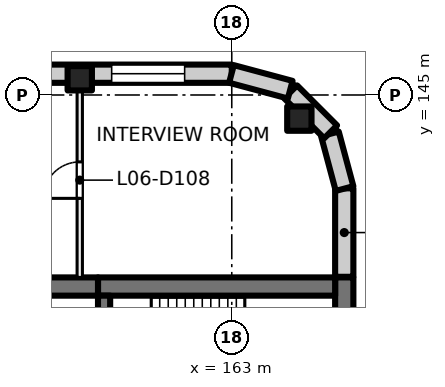
"""IFC4 building model, lengths in metres.
Left out: names, types, materials, properties, quantities, classifications, styles, units other than length and angle.
Written with IfcOpenShell. Run it as: python <this file> out.ifc"""

import sys

from ifc_helpers import new_model, si_unit, direction, frame, frame_2d, origin, origin_2d, place, context, subcontext, project, spatial, rectangle, extrude, element, fill, save


model = new_model("IFC4")
c1 = context("Model", 3, precision=1e-05, world=origin(), true_north=direction((0.0, 1.0)))
c2 = subcontext(c1, "Body", "Model", "MODEL_VIEW")
j1 = project(units=[si_unit("LENGTHUNIT", "METRE"), si_unit("PLANEANGLEUNIT", "RADIAN")], contexts=[c1])
p1 = place(None, origin())
s1 = spatial("IfcSite", under=j1, at=p1, CompositionType="ELEMENT")
p2 = place(p1, origin())
s2 = spatial("IfcBuilding", under=s1, at=p2, CompositionType="ELEMENT")
p3 = place(p2, frame((0.0, 0.0, 31.5)))
s3 = spatial("IfcBuildingStorey", under=s2, at=p3, CompositionType="ELEMENT", Elevation=31.5)
for number, where, z_axis, x_axis in (
    (1, (165.223, 144.223, 0.0), (0.0, 0.0, 1.0), (1.0, 0.0, 0.0)),
    (2, (158.0, 145.55, 0.0), (0.0, 0.0, 1.0), (1.0, 0.0, 0.0)),
):
    element("IfcColumn", number, at=place(p3, frame(where, z_axis=z_axis, x_axis=x_axis)), inside=s3, PredefinedType="COLUMN", context=c2, shape_type="SweptSolid", body=[
        extrude(rectangle(XDim=0.8, YDim=0.8, at=origin_2d()), origin(), (0.0, 0.0, 1.0), 4.0),
    ])
p4 = place(p3, frame((166.7, 139.0, 0.0), z_axis=(0.0, 0.0, 1.0), x_axis=(0.0, -1.0, 0.0)))
e3 = element("IfcWall", 3, at=p4, inside=s3, PredefinedType="SHEAR", context=c2, shape_type="SweptSolid", body=[
    extrude(rectangle(XDim=3.8, YDim=0.6, at=frame_2d((1.9, 0.0))), origin(), (0.0, 0.0, 1.0), 4.0),
])
p5 = place(p3, frame((166.4, 138.7, 0.0), z_axis=(0.0, 0.0, 1.0), x_axis=(-1.0, 0.0, 0.0)))
e4 = element("IfcWall", 4, at=p5, inside=s3, PredefinedType="SHEAR", context=c2, shape_type="SweptSolid", body=[
    extrude(rectangle(XDim=7.8, YDim=0.6, at=frame_2d((3.9, 0.0))), origin(), (0.0, 0.0, 1.0), 4.0),
])
p6 = place(p3, frame((158.6, 138.7, 0.0), z_axis=(0.0, 0.0, 1.0), x_axis=(-1.0, 0.0, 0.0)))
e5 = element("IfcWall", 5, at=p6, inside=s3, PredefinedType="SHEAR", context=c2, shape_type="SweptSolid", body=[
    extrude(rectangle(XDim=4.6, YDim=0.6, at=frame_2d((2.3, 0.0))), origin(), (0.0, 0.0, 1.0), 4.0),
])
p7 = place(p3, frame((158.8, 138.4, 0.0), z_axis=(0.0, 0.0, 1.0), x_axis=(0.0, -1.0, 0.0)))
e6 = element("IfcWall", 6, at=p7, inside=s3, PredefinedType="SHEAR", context=c2, shape_type="SweptSolid", body=[
    extrude(rectangle(XDim=2.8, YDim=0.4, at=frame_2d((1.4, 0.0))), origin(), (0.0, 0.0, 1.0), 4.0),
])
p8 = place(p7, frame((0.9, 0.0, 0.0)))
e7 = element("IfcOpeningElement", 7, at=p8, cuts=e6, PredefinedType="OPENING", context=c2, shape_type="SweptSolid", body=[
    extrude(rectangle(XDim=1.0, YDim=2.1, at=frame_2d((0.5, 1.05))), frame((0.0, 0.21, 0.0), z_axis=(0.0, -1.0, 0.0), x_axis=(1.0, 0.0, 0.0)), (0.0, 0.0, 1.0), 0.42),
])
p9 = place(p3, frame((131.07, 145.7, 0.0), z_axis=(0.0, 0.0, 1.0), x_axis=(1.0, 0.0, 0.0)))
e8 = element("IfcWall", 8, at=p9, inside=s3, PredefinedType="SOLIDWALL", context=c2, shape_type="SweptSolid", body=[
    extrude(rectangle(XDim=31.93, YDim=0.6, at=frame_2d((15.965, 0.0))), origin(), (0.0, 0.0, 1.0), 3.625),
])
p10 = place(p9, frame((0.98, 0.0, 0.9)))
e9 = element("IfcOpeningElement", 9, at=p10, cuts=e8, PredefinedType="OPENING", context=c2, shape_type="SweptSolid", body=[
    extrude(rectangle(XDim=2.4, YDim=2.4, at=frame_2d((1.2, 1.2))), frame((0.0, 0.31, 0.0), z_axis=(0.0, -1.0, 0.0), x_axis=(1.0, 0.0, 0.0)), (0.0, 0.0, 1.0), 0.62),
])
p11 = place(p9, frame((5.48, 0.0, 0.9)))
e10 = element("IfcOpeningElement", 10, at=p11, cuts=e8, PredefinedType="OPENING", context=c2, shape_type="SweptSolid", body=[
    extrude(rectangle(XDim=2.4, YDim=2.4, at=frame_2d((1.2, 1.2))), frame((0.0, 0.31, 0.0), z_axis=(0.0, -1.0, 0.0), x_axis=(1.0, 0.0, 0.0)), (0.0, 0.0, 1.0), 0.62),
])
p12 = place(p9, frame((9.98, 0.0, 0.9)))
e11 = element("IfcOpeningElement", 11, at=p12, cuts=e8, PredefinedType="OPENING", context=c2, shape_type="SweptSolid", body=[
    extrude(rectangle(XDim=2.4, YDim=2.4, at=frame_2d((1.2, 1.2))), frame((0.0, 0.31, 0.0), z_axis=(0.0, -1.0, 0.0), x_axis=(1.0, 0.0, 0.0)), (0.0, 0.0, 1.0), 0.62),
])
p13 = place(p9, frame((14.48, 0.0, 0.9)))
e12 = element("IfcOpeningElement", 12, at=p13, cuts=e8, PredefinedType="OPENING", context=c2, shape_type="SweptSolid", body=[
    extrude(rectangle(XDim=2.4, YDim=2.4, at=frame_2d((1.2, 1.2))), frame((0.0, 0.31, 0.0), z_axis=(0.0, -1.0, 0.0), x_axis=(1.0, 0.0, 0.0)), (0.0, 0.0, 1.0), 0.62),
])
p14 = place(p9, frame((18.98, 0.0, 0.9)))
e13 = element("IfcOpeningElement", 13, at=p14, cuts=e8, PredefinedType="OPENING", context=c2, shape_type="SweptSolid", body=[
    extrude(rectangle(XDim=2.4, YDim=2.4, at=frame_2d((1.2, 1.2))), frame((0.0, 0.31, 0.0), z_axis=(0.0, -1.0, 0.0), x_axis=(1.0, 0.0, 0.0)), (0.0, 0.0, 1.0), 0.62),
])
p15 = place(p9, frame((23.48, 0.0, 0.9)))
e14 = element("IfcOpeningElement", 14, at=p15, cuts=e8, PredefinedType="OPENING", context=c2, shape_type="SweptSolid", body=[
    extrude(rectangle(XDim=2.4, YDim=2.4, at=frame_2d((1.2, 1.2))), frame((0.0, 0.31, 0.0), z_axis=(0.0, -1.0, 0.0), x_axis=(1.0, 0.0, 0.0)), (0.0, 0.0, 1.0), 0.62),
])
p16 = place(p9, frame((27.98, 0.0, 0.9)))
e15 = element("IfcOpeningElement", 15, at=p16, cuts=e8, PredefinedType="OPENING", context=c2, shape_type="SweptSolid", body=[
    extrude(rectangle(XDim=2.4, YDim=2.4, at=frame_2d((1.2, 1.2))), frame((0.0, 0.31, 0.0), z_axis=(0.0, -1.0, 0.0), x_axis=(1.0, 0.0, 0.0)), (0.0, 0.0, 1.0), 0.62),
])
p17 = place(p3, frame((166.7, 141.93, 0.0), z_axis=(0.0, 0.0, 1.0), x_axis=(0.0, -1.0, 0.0)))
e16 = element("IfcWall", 16, at=p17, inside=s3, PredefinedType="SOLIDWALL", context=c2, shape_type="SweptSolid", body=[
    extrude(rectangle(XDim=2.91, YDim=0.6, at=frame_2d((1.455, 0.0))), origin(), (0.0, 0.0, 1.0), 3.625),
])
for number, where, z_axis, x_axis in (
    (17, (166.229, 143.719, 0.0), (0.0, 0.0, 1.0), (0.259, -0.966, 0.0)),
    (18, (164.936, 145.104, 0.0), (0.0, 0.0, 1.0), (0.707, -0.707, 0.0)),
):
    element("IfcWall", number, at=place(p3, frame(where, z_axis=z_axis, x_axis=x_axis)), inside=s3, PredefinedType="SOLIDWALL", context=c2, shape_type="SweptSolid", body=[
        extrude(rectangle(XDim=1.861, YDim=0.6, at=frame_2d((0.93, 0.0))), origin(), (0.0, 0.0, 1.0), 3.625),
    ])
p18 = place(p3, frame((162.99, 145.692, 0.0), z_axis=(0.0, 0.0, 1.0), x_axis=(0.965920269068, -0.258839784042, 0.0)))
e19 = element("IfcWall", 19, at=p18, inside=s3, PredefinedType="SOLIDWALL", context=c2, shape_type="SweptSolid", body=[
    extrude(rectangle(XDim=2.0, YDim=0.6, at=frame_2d((1.0, 0.0))), origin(), (0.0, 0.0, 1.0), 3.625),
])
p19 = place(p3, frame((158.0, 139.0, 0.0), z_axis=(0.0, 0.0, 1.0), x_axis=(0.0, 1.0, 0.0)))
e20 = element("IfcWall", 20, at=p19, inside=s3, PredefinedType="PARTITIONING", context=c2, shape_type="SweptSolid", body=[
    extrude(rectangle(XDim=6.4, YDim=0.175, at=frame_2d((3.2, 0.0))), origin(), (0.0, 0.0, 1.0), 3.625),
])
p20 = place(p19, frame((2.6, 0.0, 0.0)))
e21 = element("IfcOpeningElement", 21, at=p20, cuts=e20, PredefinedType="OPENING", context=c2, shape_type="SweptSolid", body=[
    extrude(rectangle(XDim=1.2, YDim=2.1, at=frame_2d((0.6, 1.05))), frame((0.0, 0.097, 0.0), z_axis=(0.0, -1.0, 0.0), x_axis=(1.0, 0.0, 0.0)), (0.0, 0.0, 1.0), 0.195),
])
p21 = place(p16, origin())
e22 = element("IfcWindow", 22, at=p21, inside=s3, PartitioningType="SINGLE_PANEL", PredefinedType="WINDOW", context=c2, shape_type="SweptSolid", body=[
    extrude(rectangle(XDim=2.4, YDim=2.4, at=frame_2d((1.2, 1.2))), frame((0.0, 0.03, 0.0), z_axis=(0.0, -1.0, 0.0), x_axis=(1.0, 0.0, 0.0)), (0.0, 0.0, 1.0), 0.06),
])
fill(e15, e22)
p22 = place(p20, origin())
e23 = element("IfcDoor", 23, at=p22, inside=s3, OperationType="DOUBLE_DOOR_SINGLE_SWING", PredefinedType="DOOR", context=c2, shape_type="SweptSolid", body=[
    extrude(rectangle(XDim=1.2, YDim=2.1, at=frame_2d((0.6, 1.05))), frame((0.0, 0.025, 0.0), z_axis=(0.0, -1.0, 0.0), x_axis=(1.0, 0.0, 0.0)), (0.0, 0.0, 1.0), 0.05),
])
fill(e21, e23)
save(model, sys.argv[1])
